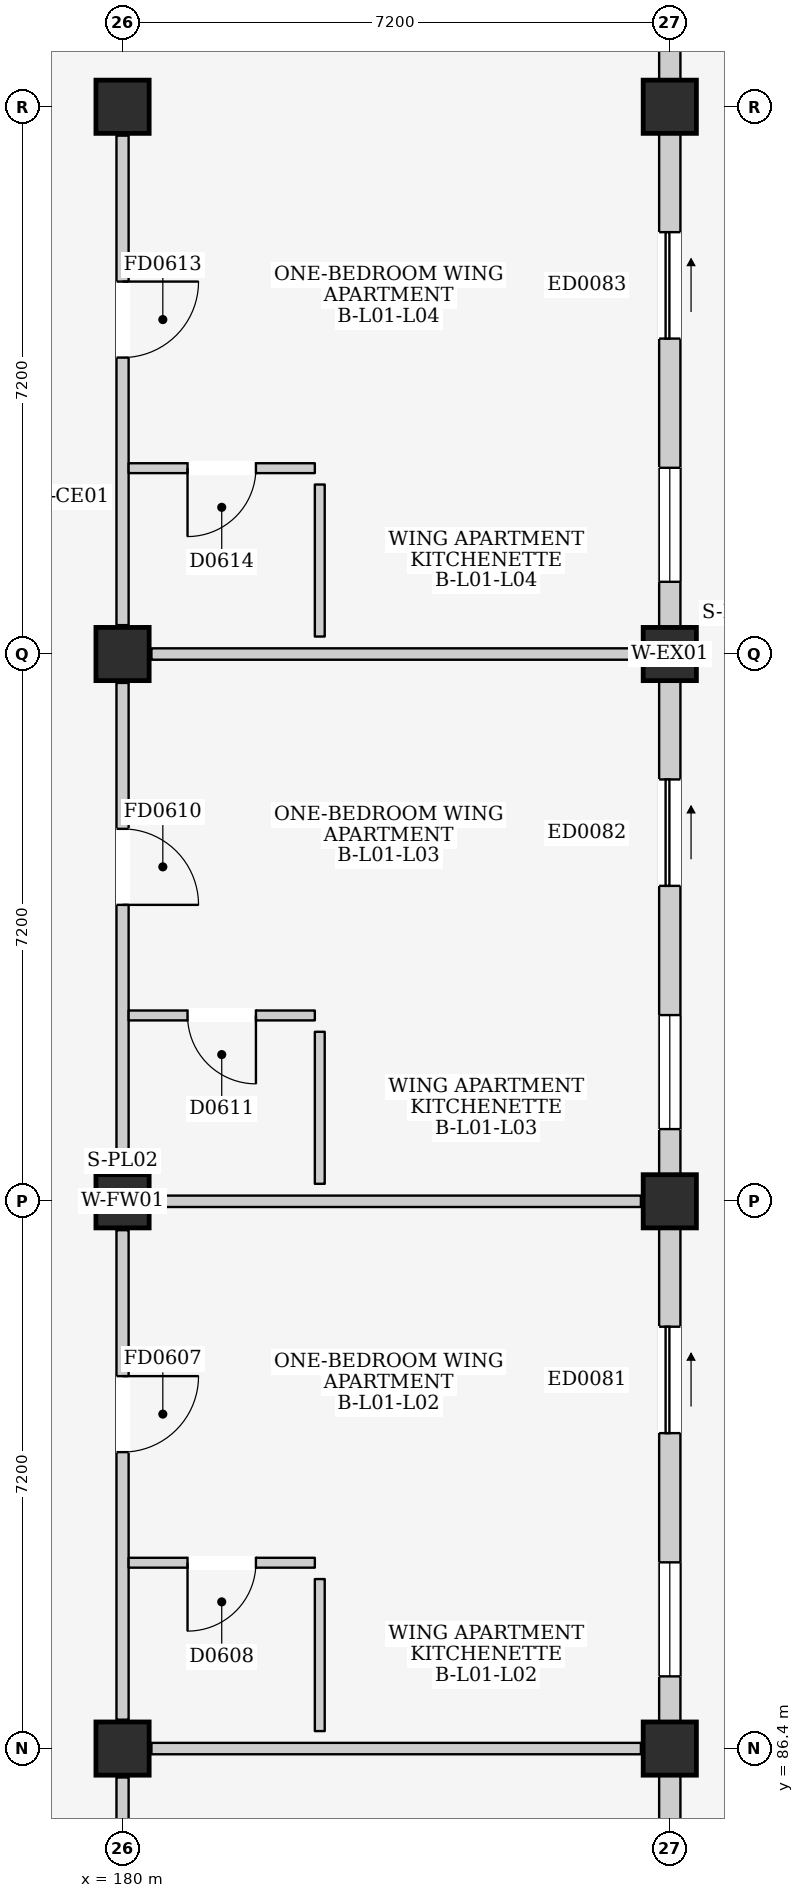
"""IFC4 building model, lengths in metres.
Left out: names, types, materials, properties, quantities, classifications, styles, units other than length and angle.
Written with IfcOpenShell. Run it as: python <this file> out.ifc"""

import sys

from ifc_helpers import new_model, si_unit, direction, frame, frame_2d, origin, origin_2d, place, context, subcontext, project, spatial, rectangle, extrude, element, fill, save


model = new_model("IFC4")
c1 = context("Model", 3, precision=1e-05, world=origin(), true_north=direction((0.0, 1.0)))
c2 = subcontext(c1, "Body", "Model", "MODEL_VIEW")
j1 = project(units=[si_unit("LENGTHUNIT", "METRE"), si_unit("PLANEANGLEUNIT", "RADIAN")], contexts=[c1])
p1 = place(None, origin())
s1 = spatial("IfcSite", under=j1, at=p1, CompositionType="ELEMENT")
p2 = place(p1, origin())
s2 = spatial("IfcBuilding", under=s1, at=p2, CompositionType="ELEMENT")
p3 = place(p2, frame((0.0, 0.0, 4.5)))
s3 = spatial("IfcBuildingStorey", under=s2, at=p3, CompositionType="ELEMENT", Elevation=4.5)
for number, where, z_axis, x_axis in (
    (1, (180.0, 86.4, 0.0), (0.0, 0.0, 1.0), (1.0, 0.0, 0.0)),
    (2, (180.0, 93.6, 0.0), (0.0, 0.0, 1.0), (1.0, 0.0, 0.0)),
    (3, (180.0, 100.8, 0.0), (0.0, 0.0, 1.0), (1.0, 0.0, 0.0)),
    (4, (180.0, 108.0, 0.0), (0.0, 0.0, 1.0), (1.0, 0.0, 0.0)),
    (5, (187.2, 86.4, 0.0), (0.0, 0.0, 1.0), (1.0, 0.0, 0.0)),
    (6, (187.2, 93.6, 0.0), (0.0, 0.0, 1.0), (1.0, 0.0, 0.0)),
    (7, (187.2, 100.8, 0.0), (0.0, 0.0, 1.0), (1.0, 0.0, 0.0)),
    (8, (187.2, 108.0, 0.0), (0.0, 0.0, 1.0), (1.0, 0.0, 0.0)),
):
    element("IfcColumn", number, at=place(p3, frame(where, z_axis=z_axis, x_axis=x_axis)), inside=s3, PredefinedType="COLUMN", context=c2, shape_type="SweptSolid", body=[
        extrude(rectangle(XDim=0.7, YDim=0.7, at=origin_2d()), origin(), (0.0, 0.0, 1.0), 4.5),
    ])
p4 = place(p3, frame((187.2, 79.55, 0.0), z_axis=(0.0, 0.0, 1.0), x_axis=(0.0, 1.0, 0.0)))
e9 = element("IfcWall", 9, at=p4, inside=s3, PredefinedType="ELEMENTEDWALL", context=c2, shape_type="SweptSolid", body=[
    extrude(rectangle(XDim=6.5, YDim=0.28, at=frame_2d((3.25, 0.0))), origin(), (0.0, 0.0, 1.0), 3.715),
])
p5 = place(p4, frame((3.8, 0.0, 0.0)))
e10 = element("IfcOpeningElement", 10, at=p5, cuts=e9, PredefinedType="OPENING", context=c2, shape_type="SweptSolid", body=[
    extrude(rectangle(XDim=1.4, YDim=2.1, at=frame_2d((0.7, 1.05))), frame((0.0, 0.155, 0.0), z_axis=(0.0, -1.0, 0.0), x_axis=(1.0, 0.0, 0.0)), (0.0, 0.0, 1.0), 0.31),
])
p6 = place(p4, frame((0.6, 0.0, 0.95)))
e11 = element("IfcOpeningElement", 11, at=p6, cuts=e9, PredefinedType="OPENING", context=c2, shape_type="SweptSolid", body=[
    extrude(rectangle(XDim=1.5, YDim=1.5, at=frame_2d((0.75, 0.75))), frame((0.0, 0.155, 0.0), z_axis=(0.0, -1.0, 0.0), x_axis=(1.0, 0.0, 0.0)), (0.0, 0.0, 1.0), 0.31),
])
p7 = place(p3, frame((187.2, 86.75, 0.0), z_axis=(0.0, 0.0, 1.0), x_axis=(0.0, 1.0, 0.0)))
e12 = element("IfcWall", 12, at=p7, inside=s3, PredefinedType="ELEMENTEDWALL", context=c2, shape_type="SweptSolid", body=[
    extrude(rectangle(XDim=6.5, YDim=0.28, at=frame_2d((3.25, 0.0))), origin(), (0.0, 0.0, 1.0), 3.715),
])
p8 = place(p7, frame((3.8, 0.0, 0.0)))
e13 = element("IfcOpeningElement", 13, at=p8, cuts=e12, PredefinedType="OPENING", context=c2, shape_type="SweptSolid", body=[
    extrude(rectangle(XDim=1.4, YDim=2.1, at=frame_2d((0.7, 1.05))), frame((0.0, 0.155, 0.0), z_axis=(0.0, -1.0, 0.0), x_axis=(1.0, 0.0, 0.0)), (0.0, 0.0, 1.0), 0.31),
])
p9 = place(p7, frame((0.6, 0.0, 0.95)))
e14 = element("IfcOpeningElement", 14, at=p9, cuts=e12, PredefinedType="OPENING", context=c2, shape_type="SweptSolid", body=[
    extrude(rectangle(XDim=1.5, YDim=1.5, at=frame_2d((0.75, 0.75))), frame((0.0, 0.155, 0.0), z_axis=(0.0, -1.0, 0.0), x_axis=(1.0, 0.0, 0.0)), (0.0, 0.0, 1.0), 0.31),
])
p10 = place(p3, frame((187.2, 93.95, 0.0), z_axis=(0.0, 0.0, 1.0), x_axis=(0.0, 1.0, 0.0)))
e15 = element("IfcWall", 15, at=p10, inside=s3, PredefinedType="ELEMENTEDWALL", context=c2, shape_type="SweptSolid", body=[
    extrude(rectangle(XDim=6.5, YDim=0.28, at=frame_2d((3.25, 0.0))), origin(), (0.0, 0.0, 1.0), 3.715),
])
p11 = place(p10, frame((3.8, 0.0, 0.0)))
e16 = element("IfcOpeningElement", 16, at=p11, cuts=e15, PredefinedType="OPENING", context=c2, shape_type="SweptSolid", body=[
    extrude(rectangle(XDim=1.4, YDim=2.1, at=frame_2d((0.7, 1.05))), frame((0.0, 0.155, 0.0), z_axis=(0.0, -1.0, 0.0), x_axis=(1.0, 0.0, 0.0)), (0.0, 0.0, 1.0), 0.31),
])
p12 = place(p10, frame((0.6, 0.0, 0.95)))
e17 = element("IfcOpeningElement", 17, at=p12, cuts=e15, PredefinedType="OPENING", context=c2, shape_type="SweptSolid", body=[
    extrude(rectangle(XDim=1.5, YDim=1.5, at=frame_2d((0.75, 0.75))), frame((0.0, 0.155, 0.0), z_axis=(0.0, -1.0, 0.0), x_axis=(1.0, 0.0, 0.0)), (0.0, 0.0, 1.0), 0.31),
])
p13 = place(p3, frame((187.2, 101.15, 0.0), z_axis=(0.0, 0.0, 1.0), x_axis=(0.0, 1.0, 0.0)))
e18 = element("IfcWall", 18, at=p13, inside=s3, PredefinedType="ELEMENTEDWALL", context=c2, shape_type="SweptSolid", body=[
    extrude(rectangle(XDim=6.5, YDim=0.28, at=frame_2d((3.25, 0.0))), origin(), (0.0, 0.0, 1.0), 3.715),
])
p14 = place(p13, frame((3.8, 0.0, 0.0)))
e19 = element("IfcOpeningElement", 19, at=p14, cuts=e18, PredefinedType="OPENING", context=c2, shape_type="SweptSolid", body=[
    extrude(rectangle(XDim=1.4, YDim=2.1, at=frame_2d((0.7, 1.05))), frame((0.0, 0.155, 0.0), z_axis=(0.0, -1.0, 0.0), x_axis=(1.0, 0.0, 0.0)), (0.0, 0.0, 1.0), 0.31),
])
p15 = place(p13, frame((0.6, 0.0, 0.95)))
e20 = element("IfcOpeningElement", 20, at=p15, cuts=e18, PredefinedType="OPENING", context=c2, shape_type="SweptSolid", body=[
    extrude(rectangle(XDim=1.5, YDim=1.5, at=frame_2d((0.75, 0.75))), frame((0.0, 0.155, 0.0), z_axis=(0.0, -1.0, 0.0), x_axis=(1.0, 0.0, 0.0)), (0.0, 0.0, 1.0), 0.31),
])
p16 = place(p3, frame((187.2, 108.35, 0.0), z_axis=(0.0, 0.0, 1.0), x_axis=(0.0, 1.0, 0.0)))
e21 = element("IfcWall", 21, at=p16, inside=s3, PredefinedType="ELEMENTEDWALL", context=c2, shape_type="SweptSolid", body=[
    extrude(rectangle(XDim=6.5, YDim=0.28, at=frame_2d((3.25, 0.0))), origin(), (0.0, 0.0, 1.0), 3.715),
])
p17 = place(p16, frame((3.65, 0.0, 0.0)))
e22 = element("IfcOpeningElement", 22, at=p17, cuts=e21, PredefinedType="OPENING", context=c2, shape_type="SweptSolid", body=[
    extrude(rectangle(XDim=1.4, YDim=2.1, at=frame_2d((0.7, 1.05))), frame((0.0, 0.155, 0.0), z_axis=(0.0, -1.0, 0.0), x_axis=(1.0, 0.0, 0.0)), (0.0, 0.0, 1.0), 0.31),
])
p18 = place(p3, frame((180.0, 79.58, 0.0), z_axis=(0.0, 0.0, 1.0), x_axis=(0.0, 1.0, 0.0)))
e23 = element("IfcWall", 23, at=p18, inside=s3, PredefinedType="PARTITIONING", context=c2, shape_type="SweptSolid", body=[
    extrude(rectangle(XDim=6.44, YDim=0.16, at=frame_2d((3.22, 0.0))), origin(), (0.0, 0.0, 1.0), 3.685),
])
p19 = place(p18, frame((3.52, 0.0, 0.0)))
e24 = element("IfcOpeningElement", 24, at=p19, cuts=e23, PredefinedType="OPENING", context=c2, shape_type="SweptSolid", body=[
    extrude(rectangle(XDim=1.0, YDim=2.15, at=frame_2d((0.5, 1.075))), frame((0.0, 0.095, 0.0), z_axis=(0.0, -1.0, 0.0), x_axis=(1.0, 0.0, 0.0)), (0.0, 0.0, 1.0), 0.19),
])
p20 = place(p3, frame((180.38, 86.4, 0.0), z_axis=(0.0, 0.0, 1.0), x_axis=(1.0, 0.0, 0.0)))
e25 = element("IfcWall", 25, at=p20, inside=s3, PredefinedType="PARTITIONING", context=c2, shape_type="SweptSolid", body=[
    extrude(rectangle(XDim=6.44, YDim=0.15, at=frame_2d((3.22, 0.0))), origin(), (0.0, 0.0, 1.0), 3.635),
])
p21 = place(p3, frame((180.0, 86.78, 0.0), z_axis=(0.0, 0.0, 1.0), x_axis=(0.0, 1.0, 0.0)))
e26 = element("IfcWall", 26, at=p21, inside=s3, PredefinedType="PARTITIONING", context=c2, shape_type="SweptSolid", body=[
    extrude(rectangle(XDim=6.44, YDim=0.16, at=frame_2d((3.22, 0.0))), origin(), (0.0, 0.0, 1.0), 3.685),
])
p22 = place(p21, frame((3.52, 0.0, 0.0)))
e27 = element("IfcOpeningElement", 27, at=p22, cuts=e26, PredefinedType="OPENING", context=c2, shape_type="SweptSolid", body=[
    extrude(rectangle(XDim=1.0, YDim=2.15, at=frame_2d((0.5, 1.075))), frame((0.0, 0.095, 0.0), z_axis=(0.0, -1.0, 0.0), x_axis=(1.0, 0.0, 0.0)), (0.0, 0.0, 1.0), 0.19),
])
p23 = place(p3, frame((180.38, 93.6, 0.0), z_axis=(0.0, 0.0, 1.0), x_axis=(1.0, 0.0, 0.0)))
e28 = element("IfcWall", 28, at=p23, inside=s3, PredefinedType="PARTITIONING", context=c2, shape_type="SweptSolid", body=[
    extrude(rectangle(XDim=6.44, YDim=0.15, at=frame_2d((3.22, 0.0))), origin(), (0.0, 0.0, 1.0), 3.635),
])
p24 = place(p3, frame((180.08, 88.845, 0.0), z_axis=(0.0, 0.0, 1.0), x_axis=(1.0, 0.0, 0.0)))
e29 = element("IfcWall", 29, at=p24, inside=s3, PredefinedType="PARTITIONING", context=c2, shape_type="SweptSolid", body=[
    extrude(rectangle(XDim=2.45, YDim=0.13, at=frame_2d((1.225, 0.0))), origin(), (0.0, 0.0, 1.0), 4.25),
])
p25 = place(p24, frame((0.775, 0.0, 0.0)))
e30 = element("IfcOpeningElement", 30, at=p25, cuts=e29, PredefinedType="OPENING", context=c2, shape_type="SweptSolid", body=[
    extrude(rectangle(XDim=0.9, YDim=2.1, at=frame_2d((0.45, 1.05))), frame((0.0, 0.08, 0.0), z_axis=(0.0, -1.0, 0.0), x_axis=(1.0, 0.0, 0.0)), (0.0, 0.0, 1.0), 0.16),
])
p26 = place(p3, frame((182.595, 86.63, 0.0), z_axis=(0.0, 0.0, 1.0), x_axis=(0.0, 1.0, 0.0)))
e31 = element("IfcWall", 31, at=p26, inside=s3, PredefinedType="PARTITIONING", context=c2, shape_type="SweptSolid", body=[
    extrude(rectangle(XDim=2.0, YDim=0.13, at=frame_2d((1.0, 0.0))), origin(), (0.0, 0.0, 1.0), 4.25),
])
p27 = place(p3, frame((180.0, 93.98, 0.0), z_axis=(0.0, 0.0, 1.0), x_axis=(0.0, 1.0, 0.0)))
e32 = element("IfcWall", 32, at=p27, inside=s3, PredefinedType="PARTITIONING", context=c2, shape_type="SweptSolid", body=[
    extrude(rectangle(XDim=6.44, YDim=0.16, at=frame_2d((3.22, 0.0))), origin(), (0.0, 0.0, 1.0), 3.685),
])
p28 = place(p27, frame((3.52, 0.0, 0.0)))
e33 = element("IfcOpeningElement", 33, at=p28, cuts=e32, PredefinedType="OPENING", context=c2, shape_type="SweptSolid", body=[
    extrude(rectangle(XDim=1.0, YDim=2.15, at=frame_2d((0.5, 1.075))), frame((0.0, 0.095, 0.0), z_axis=(0.0, -1.0, 0.0), x_axis=(1.0, 0.0, 0.0)), (0.0, 0.0, 1.0), 0.19),
])
p29 = place(p3, frame((180.38, 100.8, 0.0), z_axis=(0.0, 0.0, 1.0), x_axis=(1.0, 0.0, 0.0)))
e34 = element("IfcWall", 34, at=p29, inside=s3, PredefinedType="PARTITIONING", context=c2, shape_type="SweptSolid", body=[
    extrude(rectangle(XDim=6.44, YDim=0.15, at=frame_2d((3.22, 0.0))), origin(), (0.0, 0.0, 1.0), 3.635),
])
p30 = place(p3, frame((180.08, 96.045, 0.0), z_axis=(0.0, 0.0, 1.0), x_axis=(1.0, 0.0, 0.0)))
e35 = element("IfcWall", 35, at=p30, inside=s3, PredefinedType="PARTITIONING", context=c2, shape_type="SweptSolid", body=[
    extrude(rectangle(XDim=2.45, YDim=0.13, at=frame_2d((1.225, 0.0))), origin(), (0.0, 0.0, 1.0), 4.25),
])
p31 = place(p30, frame((0.775, 0.0, 0.0)))
e36 = element("IfcOpeningElement", 36, at=p31, cuts=e35, PredefinedType="OPENING", context=c2, shape_type="SweptSolid", body=[
    extrude(rectangle(XDim=0.9, YDim=2.1, at=frame_2d((0.45, 1.05))), frame((0.0, 0.08, 0.0), z_axis=(0.0, -1.0, 0.0), x_axis=(1.0, 0.0, 0.0)), (0.0, 0.0, 1.0), 0.16),
])
p32 = place(p3, frame((182.595, 93.83, 0.0), z_axis=(0.0, 0.0, 1.0), x_axis=(0.0, 1.0, 0.0)))
e37 = element("IfcWall", 37, at=p32, inside=s3, PredefinedType="PARTITIONING", context=c2, shape_type="SweptSolid", body=[
    extrude(rectangle(XDim=2.0, YDim=0.13, at=frame_2d((1.0, 0.0))), origin(), (0.0, 0.0, 1.0), 4.25),
])
p33 = place(p3, frame((180.0, 101.18, 0.0), z_axis=(0.0, 0.0, 1.0), x_axis=(0.0, 1.0, 0.0)))
e38 = element("IfcWall", 38, at=p33, inside=s3, PredefinedType="PARTITIONING", context=c2, shape_type="SweptSolid", body=[
    extrude(rectangle(XDim=6.44, YDim=0.16, at=frame_2d((3.22, 0.0))), origin(), (0.0, 0.0, 1.0), 3.685),
])
p34 = place(p33, frame((3.52, 0.0, 0.0)))
e39 = element("IfcOpeningElement", 39, at=p34, cuts=e38, PredefinedType="OPENING", context=c2, shape_type="SweptSolid", body=[
    extrude(rectangle(XDim=1.0, YDim=2.15, at=frame_2d((0.5, 1.075))), frame((0.0, 0.095, 0.0), z_axis=(0.0, -1.0, 0.0), x_axis=(1.0, 0.0, 0.0)), (0.0, 0.0, 1.0), 0.19),
])
p35 = place(p3, frame((180.08, 103.245, 0.0), z_axis=(0.0, 0.0, 1.0), x_axis=(1.0, 0.0, 0.0)))
e40 = element("IfcWall", 40, at=p35, inside=s3, PredefinedType="PARTITIONING", context=c2, shape_type="SweptSolid", body=[
    extrude(rectangle(XDim=2.45, YDim=0.13, at=frame_2d((1.225, 0.0))), origin(), (0.0, 0.0, 1.0), 4.25),
])
p36 = place(p35, frame((0.775, 0.0, 0.0)))
e41 = element("IfcOpeningElement", 41, at=p36, cuts=e40, PredefinedType="OPENING", context=c2, shape_type="SweptSolid", body=[
    extrude(rectangle(XDim=0.9, YDim=2.1, at=frame_2d((0.45, 1.05))), frame((0.0, 0.08, 0.0), z_axis=(0.0, -1.0, 0.0), x_axis=(1.0, 0.0, 0.0)), (0.0, 0.0, 1.0), 0.16),
])
p37 = place(p3, frame((182.595, 101.03, 0.0), z_axis=(0.0, 0.0, 1.0), x_axis=(0.0, 1.0, 0.0)))
e42 = element("IfcWall", 42, at=p37, inside=s3, PredefinedType="PARTITIONING", context=c2, shape_type="SweptSolid", body=[
    extrude(rectangle(XDim=2.0, YDim=0.13, at=frame_2d((1.0, 0.0))), origin(), (0.0, 0.0, 1.0), 4.25),
])
p38 = place(p8, frame((1.4, 0.0, 0.0), z_axis=(0.0, 0.0, 1.0), x_axis=(-1.0, 0.0, 0.0)))
e43 = element("IfcDoor", 43, at=p38, inside=s3, OperationType="SLIDING_TO_RIGHT", PredefinedType="DOOR", context=c2, shape_type="SweptSolid", body=[
    extrude(rectangle(XDim=1.4, YDim=2.1, at=frame_2d((0.7, 1.05))), frame((0.0, 0.025, 0.0), z_axis=(0.0, -1.0, 0.0), x_axis=(1.0, 0.0, 0.0)), (0.0, 0.0, 1.0), 0.05),
])
fill(e13, e43)
p39 = place(p9, origin())
e44 = element("IfcWindow", 44, at=p39, inside=s3, PartitioningType="DOUBLE_PANEL_VERTICAL", PredefinedType="WINDOW", context=c2, shape_type="SweptSolid", body=[
    extrude(rectangle(XDim=1.5, YDim=1.5, at=frame_2d((0.75, 0.75))), frame((0.0, 0.03, 0.0), z_axis=(0.0, -1.0, 0.0), x_axis=(1.0, 0.0, 0.0)), (0.0, 0.0, 1.0), 0.06),
])
fill(e14, e44)
p40 = place(p11, frame((1.4, 0.0, 0.0), z_axis=(0.0, 0.0, 1.0), x_axis=(-1.0, 0.0, 0.0)))
e45 = element("IfcDoor", 45, at=p40, inside=s3, OperationType="SLIDING_TO_RIGHT", PredefinedType="DOOR", context=c2, shape_type="SweptSolid", body=[
    extrude(rectangle(XDim=1.4, YDim=2.1, at=frame_2d((0.7, 1.05))), frame((0.0, 0.025, 0.0), z_axis=(0.0, -1.0, 0.0), x_axis=(1.0, 0.0, 0.0)), (0.0, 0.0, 1.0), 0.05),
])
fill(e16, e45)
p41 = place(p12, origin())
e46 = element("IfcWindow", 46, at=p41, inside=s3, PartitioningType="DOUBLE_PANEL_VERTICAL", PredefinedType="WINDOW", context=c2, shape_type="SweptSolid", body=[
    extrude(rectangle(XDim=1.5, YDim=1.5, at=frame_2d((0.75, 0.75))), frame((0.0, 0.03, 0.0), z_axis=(0.0, -1.0, 0.0), x_axis=(1.0, 0.0, 0.0)), (0.0, 0.0, 1.0), 0.06),
])
fill(e17, e46)
p42 = place(p14, frame((1.4, 0.0, 0.0), z_axis=(0.0, 0.0, 1.0), x_axis=(-1.0, 0.0, 0.0)))
e47 = element("IfcDoor", 47, at=p42, inside=s3, OperationType="SLIDING_TO_RIGHT", PredefinedType="DOOR", context=c2, shape_type="SweptSolid", body=[
    extrude(rectangle(XDim=1.4, YDim=2.1, at=frame_2d((0.7, 1.05))), frame((0.0, 0.025, 0.0), z_axis=(0.0, -1.0, 0.0), x_axis=(1.0, 0.0, 0.0)), (0.0, 0.0, 1.0), 0.05),
])
fill(e19, e47)
p43 = place(p15, origin())
e48 = element("IfcWindow", 48, at=p43, inside=s3, PartitioningType="DOUBLE_PANEL_VERTICAL", PredefinedType="WINDOW", context=c2, shape_type="SweptSolid", body=[
    extrude(rectangle(XDim=1.5, YDim=1.5, at=frame_2d((0.75, 0.75))), frame((0.0, 0.03, 0.0), z_axis=(0.0, -1.0, 0.0), x_axis=(1.0, 0.0, 0.0)), (0.0, 0.0, 1.0), 0.06),
])
fill(e20, e48)
p44 = place(p22, frame((1.0, 0.0, 0.0), z_axis=(0.0, 0.0, 1.0), x_axis=(-1.0, 0.0, 0.0)))
e49 = element("IfcDoor", 49, at=p44, inside=s3, OperationType="SINGLE_SWING_LEFT", PredefinedType="DOOR", context=c2, shape_type="SweptSolid", body=[
    extrude(rectangle(XDim=1.0, YDim=2.15, at=frame_2d((0.5, 1.075))), frame((0.0, 0.025, 0.0), z_axis=(0.0, -1.0, 0.0), x_axis=(1.0, 0.0, 0.0)), (0.0, 0.0, 1.0), 0.05),
])
fill(e27, e49)
p45 = place(p25, frame((0.9, 0.0, 0.0), z_axis=(0.0, 0.0, 1.0), x_axis=(-1.0, 0.0, 0.0)))
e50 = element("IfcDoor", 50, at=p45, inside=s3, OperationType="SINGLE_SWING_RIGHT", PredefinedType="DOOR", context=c2, shape_type="SweptSolid", body=[
    extrude(rectangle(XDim=0.9, YDim=2.1, at=frame_2d((0.45, 1.05))), frame((0.0, 0.025, 0.0), z_axis=(0.0, -1.0, 0.0), x_axis=(1.0, 0.0, 0.0)), (0.0, 0.0, 1.0), 0.05),
])
fill(e30, e50)
p46 = place(p28, frame((1.0, 0.0, 0.0), z_axis=(0.0, 0.0, 1.0), x_axis=(-1.0, 0.0, 0.0)))
e51 = element("IfcDoor", 51, at=p46, inside=s3, OperationType="SINGLE_SWING_RIGHT", PredefinedType="DOOR", context=c2, shape_type="SweptSolid", body=[
    extrude(rectangle(XDim=1.0, YDim=2.15, at=frame_2d((0.5, 1.075))), frame((0.0, 0.025, 0.0), z_axis=(0.0, -1.0, 0.0), x_axis=(1.0, 0.0, 0.0)), (0.0, 0.0, 1.0), 0.05),
])
fill(e33, e51)
p47 = place(p31, frame((0.9, 0.0, 0.0), z_axis=(0.0, 0.0, 1.0), x_axis=(-1.0, 0.0, 0.0)))
e52 = element("IfcDoor", 52, at=p47, inside=s3, OperationType="SINGLE_SWING_LEFT", PredefinedType="DOOR", context=c2, shape_type="SweptSolid", body=[
    extrude(rectangle(XDim=0.9, YDim=2.1, at=frame_2d((0.45, 1.05))), frame((0.0, 0.025, 0.0), z_axis=(0.0, -1.0, 0.0), x_axis=(1.0, 0.0, 0.0)), (0.0, 0.0, 1.0), 0.05),
])
fill(e36, e52)
p48 = place(p34, frame((1.0, 0.0, 0.0), z_axis=(0.0, 0.0, 1.0), x_axis=(-1.0, 0.0, 0.0)))
e53 = element("IfcDoor", 53, at=p48, inside=s3, OperationType="SINGLE_SWING_LEFT", PredefinedType="DOOR", context=c2, shape_type="SweptSolid", body=[
    extrude(rectangle(XDim=1.0, YDim=2.15, at=frame_2d((0.5, 1.075))), frame((0.0, 0.025, 0.0), z_axis=(0.0, -1.0, 0.0), x_axis=(1.0, 0.0, 0.0)), (0.0, 0.0, 1.0), 0.05),
])
fill(e39, e53)
p49 = place(p36, frame((0.9, 0.0, 0.0), z_axis=(0.0, 0.0, 1.0), x_axis=(-1.0, 0.0, 0.0)))
e54 = element("IfcDoor", 54, at=p49, inside=s3, OperationType="SINGLE_SWING_RIGHT", PredefinedType="DOOR", context=c2, shape_type="SweptSolid", body=[
    extrude(rectangle(XDim=0.9, YDim=2.1, at=frame_2d((0.45, 1.05))), frame((0.0, 0.025, 0.0), z_axis=(0.0, -1.0, 0.0), x_axis=(1.0, 0.0, 0.0)), (0.0, 0.0, 1.0), 0.05),
])
fill(e41, e54)
save(model, sys.argv[1])
